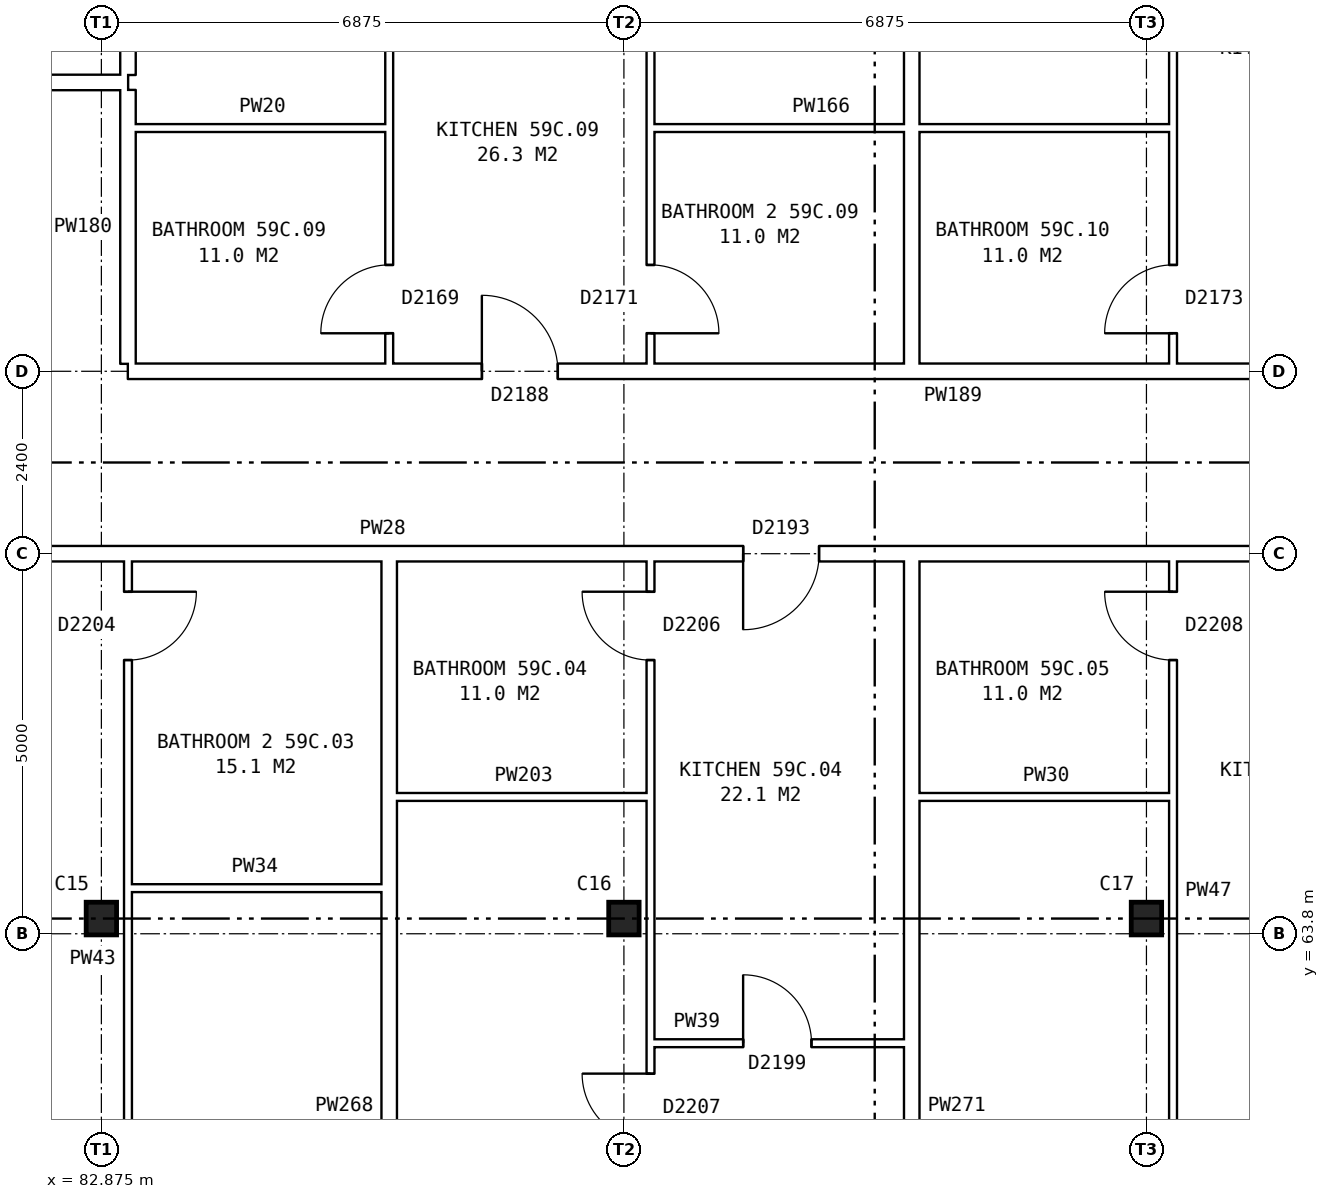
"""IFC4 building model, lengths in metres.
Left out: names, types, materials, properties, quantities, classifications, styles, units other than length and angle.
Written with IfcOpenShell. Run it as: python <this file> out.ifc"""

import sys

from ifc_helpers import new_model, si_unit, direction, frame, frame_2d, origin, origin_2d, place, context, subcontext, project, spatial, rectangle, i_section, extrude, element, fill, save


model = new_model("IFC4")
c1 = context("Model", 3, precision=1e-05, world=origin(), true_north=direction((0.0, 1.0)))
c2 = subcontext(c1, "Body", "Model", "MODEL_VIEW")
j1 = project(units=[si_unit("LENGTHUNIT", "METRE"), si_unit("PLANEANGLEUNIT", "RADIAN")], contexts=[c1])
p1 = place(None, origin())
s1 = spatial("IfcSite", under=j1, at=p1, CompositionType="ELEMENT")
p2 = place(p1, origin())
s2 = spatial("IfcBuilding", under=s1, at=p2, CompositionType="ELEMENT")
p3 = place(p2, frame((0.0, 0.0, 209.0)))
s3 = spatial("IfcBuildingStorey", under=s2, at=p3, CompositionType="ELEMENT", Elevation=209.0)
for number, where, z_axis, x_axis in (
    (1, (82.875, 64.0, 0.0), (0.0, 0.0, 1.0), (1.0, 0.0, 0.0)),
    (2, (89.75, 64.0, 0.0), (0.0, 0.0, 1.0), (1.0, 0.0, 0.0)),
    (3, (96.625, 64.0, 0.0), (0.0, 0.0, 1.0), (1.0, 0.0, 0.0)),
):
    element("IfcColumn", number, at=place(p3, frame(where, z_axis=z_axis, x_axis=x_axis)), inside=s3, PredefinedType="COLUMN", context=c2, shape_type="SweptSolid", body=[
        extrude(i_section(OverallWidth=0.4, OverallDepth=0.43, WebThickness=0.04, FlangeThickness=0.04, at=origin_2d()), origin(), (0.0, 0.0, 1.0), 2.85),
    ])
p4 = place(p3, frame((90.1, 62.36, 0.0), z_axis=(0.0, 0.0, 1.0), x_axis=(1.0, 0.0, 0.0)))
e4 = element("IfcWall", 4, at=p4, inside=s3, PredefinedType="PARTITIONING", context=c2, shape_type="SweptSolid", body=[
    extrude(rectangle(XDim=3.337, YDim=0.1, at=frame_2d((1.668, 0.0))), origin(), (0.0, 0.0, 1.0), 2.85),
])
p5 = place(p4, frame((1.219, 0.0, 0.0)))
e5 = element("IfcOpeningElement", 5, at=p5, cuts=e4, PredefinedType="OPENING", context=c2, shape_type="SweptSolid", body=[
    extrude(rectangle(XDim=0.9, YDim=2.1, at=frame_2d((0.45, 1.05))), frame((0.0, 0.06, 0.0), z_axis=(0.0, -1.0, 0.0), x_axis=(1.0, 0.0, 0.0)), (0.0, 0.0, 1.0), 0.12),
])
p6 = place(p3, frame((83.225, 64.4, 0.0), z_axis=(0.0, 0.0, 1.0), x_axis=(1.0, 0.0, 0.0)))
e6 = element("IfcWall", 6, at=p6, inside=s3, PredefinedType="PARTITIONING", context=c2, shape_type="SweptSolid", body=[
    extrude(rectangle(XDim=3.337, YDim=0.1, at=frame_2d((1.668, 0.0))), origin(), (0.0, 0.0, 1.0), 2.85),
])
for number, where, z_axis, x_axis in (
    (7, (86.762, 65.6, 0.0), (0.0, 0.0, 1.0), (1.0, 0.0, 0.0)),
    (8, (93.637, 65.6, 0.0), (0.0, 0.0, 1.0), (1.0, 0.0, 0.0)),
):
    element("IfcWall", number, at=place(p3, frame(where, z_axis=z_axis, x_axis=x_axis)), inside=s3, PredefinedType="PARTITIONING", context=c2, shape_type="SweptSolid", body=[
        extrude(rectangle(XDim=3.338, YDim=0.1, at=frame_2d((1.669, 0.0))), origin(), (0.0, 0.0, 1.0), 2.85),
    ])
p7 = place(p3, frame((75.64, 68.8, 0.0), z_axis=(0.0, 0.0, 1.0), x_axis=(1.0, 0.0, 0.0)))
e9 = element("IfcWall", 9, at=p7, inside=s3, PredefinedType="PARTITIONING", context=c2, shape_type="SweptSolid", body=[
    extrude(rectangle(XDim=55.72, YDim=0.2, at=frame_2d((27.86, 0.0))), origin(), (0.0, 0.0, 1.0), 2.85),
])
p8 = place(p7, frame((5.191, 0.0, 0.0)))
e10 = element("IfcOpeningElement", 10, at=p8, cuts=e9, PredefinedType="OPENING", context=c2, shape_type="SweptSolid", body=[
    extrude(rectangle(XDim=1.0, YDim=2.1, at=frame_2d((0.5, 1.05))), frame((0.0, 0.11, 0.0), z_axis=(0.0, -1.0, 0.0), x_axis=(1.0, 0.0, 0.0)), (0.0, 0.0, 1.0), 0.22),
])
p9 = place(p7, frame((15.678, 0.0, 0.0)))
e11 = element("IfcOpeningElement", 11, at=p9, cuts=e9, PredefinedType="OPENING", context=c2, shape_type="SweptSolid", body=[
    extrude(rectangle(XDim=1.0, YDim=2.1, at=frame_2d((0.5, 1.05))), frame((0.0, 0.11, 0.0), z_axis=(0.0, -1.0, 0.0), x_axis=(1.0, 0.0, 0.0)), (0.0, 0.0, 1.0), 0.22),
])
p10 = place(p7, frame((22.553, 0.0, 0.0)))
e12 = element("IfcOpeningElement", 12, at=p10, cuts=e9, PredefinedType="OPENING", context=c2, shape_type="SweptSolid", body=[
    extrude(rectangle(XDim=1.0, YDim=2.1, at=frame_2d((0.5, 1.05))), frame((0.0, 0.11, 0.0), z_axis=(0.0, -1.0, 0.0), x_axis=(1.0, 0.0, 0.0)), (0.0, 0.0, 1.0), 0.22),
])
p11 = place(p7, frame((32.866, 0.0, 0.0)))
e13 = element("IfcOpeningElement", 13, at=p11, cuts=e9, PredefinedType="OPENING", context=c2, shape_type="SweptSolid", body=[
    extrude(rectangle(XDim=1.0, YDim=2.1, at=frame_2d((0.5, 1.05))), frame((0.0, 0.11, 0.0), z_axis=(0.0, -1.0, 0.0), x_axis=(1.0, 0.0, 0.0)), (0.0, 0.0, 1.0), 0.22),
])
p12 = place(p7, frame((43.178, 0.0, 0.0)))
e14 = element("IfcOpeningElement", 14, at=p12, cuts=e9, PredefinedType="OPENING", context=c2, shape_type="SweptSolid", body=[
    extrude(rectangle(XDim=1.0, YDim=2.1, at=frame_2d((0.5, 1.05))), frame((0.0, 0.11, 0.0), z_axis=(0.0, -1.0, 0.0), x_axis=(1.0, 0.0, 0.0)), (0.0, 0.0, 1.0), 0.22),
])
p13 = place(p7, frame((50.053, 0.0, 0.0)))
e15 = element("IfcOpeningElement", 15, at=p13, cuts=e9, PredefinedType="OPENING", context=c2, shape_type="SweptSolid", body=[
    extrude(rectangle(XDim=1.0, YDim=2.1, at=frame_2d((0.5, 1.05))), frame((0.0, 0.11, 0.0), z_axis=(0.0, -1.0, 0.0), x_axis=(1.0, 0.0, 0.0)), (0.0, 0.0, 1.0), 0.22),
])
p14 = place(p3, frame((83.225, 71.2, 0.0), z_axis=(0.0, 0.0, 1.0), x_axis=(1.0, 0.0, 0.0)))
e16 = element("IfcWall", 16, at=p14, inside=s3, PredefinedType="PARTITIONING", context=c2, shape_type="SweptSolid", body=[
    extrude(rectangle(XDim=41.25, YDim=0.2, at=frame_2d((20.625, 0.0))), origin(), (0.0, 0.0, 1.0), 2.85),
])
p15 = place(p14, frame((4.656, 0.0, 0.0)))
e17 = element("IfcOpeningElement", 17, at=p15, cuts=e16, PredefinedType="OPENING", context=c2, shape_type="SweptSolid", body=[
    extrude(rectangle(XDim=1.0, YDim=2.1, at=frame_2d((0.5, 1.05))), frame((0.0, 0.11, 0.0), z_axis=(0.0, -1.0, 0.0), x_axis=(1.0, 0.0, 0.0)), (0.0, 0.0, 1.0), 0.22),
])
p16 = place(p14, frame((14.969, 0.0, 0.0)))
e18 = element("IfcOpeningElement", 18, at=p16, cuts=e16, PredefinedType="OPENING", context=c2, shape_type="SweptSolid", body=[
    extrude(rectangle(XDim=1.0, YDim=2.1, at=frame_2d((0.5, 1.05))), frame((0.0, 0.11, 0.0), z_axis=(0.0, -1.0, 0.0), x_axis=(1.0, 0.0, 0.0)), (0.0, 0.0, 1.0), 0.22),
])
p17 = place(p14, frame((25.281, 0.0, 0.0)))
e19 = element("IfcOpeningElement", 19, at=p17, cuts=e16, PredefinedType="OPENING", context=c2, shape_type="SweptSolid", body=[
    extrude(rectangle(XDim=1.0, YDim=2.1, at=frame_2d((0.5, 1.05))), frame((0.0, 0.11, 0.0), z_axis=(0.0, -1.0, 0.0), x_axis=(1.0, 0.0, 0.0)), (0.0, 0.0, 1.0), 0.22),
])
p18 = place(p14, frame((35.594, 0.0, 0.0)))
e20 = element("IfcOpeningElement", 20, at=p18, cuts=e16, PredefinedType="OPENING", context=c2, shape_type="SweptSolid", body=[
    extrude(rectangle(XDim=1.0, YDim=2.1, at=frame_2d((0.5, 1.05))), frame((0.0, 0.11, 0.0), z_axis=(0.0, -1.0, 0.0), x_axis=(1.0, 0.0, 0.0)), (0.0, 0.0, 1.0), 0.22),
])
p19 = place(p3, frame((83.325, 74.4, 0.0), z_axis=(0.0, 0.0, 1.0), x_axis=(1.0, 0.0, 0.0)))
e21 = element("IfcWall", 21, at=p19, inside=s3, PredefinedType="PARTITIONING", context=c2, shape_type="SweptSolid", body=[
    extrude(rectangle(XDim=3.337, YDim=0.1, at=frame_2d((1.668, 0.0))), origin(), (0.0, 0.0, 1.0), 2.85),
])
p20 = place(p3, frame((90.1, 74.4, 0.0), z_axis=(0.0, 0.0, 1.0), x_axis=(1.0, 0.0, 0.0)))
e22 = element("IfcWall", 22, at=p20, inside=s3, PredefinedType="PARTITIONING", context=c2, shape_type="SweptSolid", body=[
    extrude(rectangle(XDim=6.875, YDim=0.1, at=frame_2d((3.438, 0.0))), origin(), (0.0, 0.0, 1.0), 2.85),
])
p21 = place(p3, frame((75.64, 75.0, 0.0), z_axis=(0.0, 0.0, 1.0), x_axis=(1.0, 0.0, 0.0)))
e23 = element("IfcWall", 23, at=p21, inside=s3, PredefinedType="PARTITIONING", context=c2, shape_type="SweptSolid", body=[
    extrude(rectangle(XDim=7.585, YDim=0.2, at=frame_2d((3.792, 0.0))), origin(), (0.0, 0.0, 1.0), 2.85),
])
p22 = place(p21, frame((3.343, 0.0, 0.0)))
e24 = element("IfcOpeningElement", 24, at=p22, cuts=e23, PredefinedType="OPENING", context=c2, shape_type="SweptSolid", body=[
    extrude(rectangle(XDim=0.9, YDim=2.1, at=frame_2d((0.45, 1.05))), frame((0.0, 0.11, 0.0), z_axis=(0.0, -1.0, 0.0), x_axis=(1.0, 0.0, 0.0)), (0.0, 0.0, 1.0), 0.22),
])
p23 = place(p3, frame((83.225, 54.36, 0.0), z_axis=(0.0, 0.0, 1.0), x_axis=(0.0, 1.0, 0.0)))
e25 = element("IfcWall", 25, at=p23, inside=s3, PredefinedType="PARTITIONING", context=c2, shape_type="SweptSolid", body=[
    extrude(rectangle(XDim=14.34, YDim=0.1, at=frame_2d((7.17, 0.0))), origin(), (0.0, 0.0, 1.0), 2.85),
])
p24 = place(p23, frame((5.5, 0.0, 0.0)))
e26 = element("IfcOpeningElement", 26, at=p24, cuts=e25, PredefinedType="OPENING", context=c2, shape_type="SweptSolid", body=[
    extrude(rectangle(XDim=0.9, YDim=2.1, at=frame_2d((0.45, 1.05))), frame((0.0, 0.06, 0.0), z_axis=(0.0, -1.0, 0.0), x_axis=(1.0, 0.0, 0.0)), (0.0, 0.0, 1.0), 0.12),
])
p25 = place(p23, frame((13.04, 0.0, 0.0)))
e27 = element("IfcOpeningElement", 27, at=p25, cuts=e25, PredefinedType="OPENING", context=c2, shape_type="SweptSolid", body=[
    extrude(rectangle(XDim=0.9, YDim=2.1, at=frame_2d((0.45, 1.05))), frame((0.0, 0.06, 0.0), z_axis=(0.0, -1.0, 0.0), x_axis=(1.0, 0.0, 0.0)), (0.0, 0.0, 1.0), 0.12),
])
p26 = place(p3, frame((83.225, 71.3, 0.0), z_axis=(0.0, 0.0, 1.0), x_axis=(0.0, 1.0, 0.0)))
e28 = element("IfcWall", 28, at=p26, inside=s3, PredefinedType="PARTITIONING", context=c2, shape_type="SweptSolid", body=[
    extrude(rectangle(XDim=3.6, YDim=0.2, at=frame_2d((1.8, 0.0))), origin(), (0.0, 0.0, 1.0), 2.85),
])
p27 = place(p3, frame((83.225, 75.1, 0.0), z_axis=(0.0, 0.0, 1.0), x_axis=(0.0, 1.0, 0.0)))
e29 = element("IfcWall", 29, at=p27, inside=s3, PredefinedType="PARTITIONING", context=c2, shape_type="SweptSolid", body=[
    extrude(rectangle(XDim=10.54, YDim=0.2, at=frame_2d((5.27, 0.0))), origin(), (0.0, 0.0, 1.0), 2.85),
])
p28 = place(p3, frame((86.662, 54.36, 0.0), z_axis=(0.0, 0.0, 1.0), x_axis=(0.0, 1.0, 0.0)))
e30 = element("IfcWall", 30, at=p28, inside=s3, PredefinedType="PARTITIONING", context=c2, shape_type="SweptSolid", body=[
    extrude(rectangle(XDim=14.34, YDim=0.2, at=frame_2d((7.17, 0.0))), origin(), (0.0, 0.0, 1.0), 2.85),
])
p29 = place(p3, frame((86.662, 71.3, 0.0), z_axis=(0.0, 0.0, 1.0), x_axis=(0.0, 1.0, 0.0)))
e31 = element("IfcWall", 31, at=p29, inside=s3, PredefinedType="PARTITIONING", context=c2, shape_type="SweptSolid", body=[
    extrude(rectangle(XDim=14.34, YDim=0.1, at=frame_2d((7.17, 0.0))), origin(), (0.0, 0.0, 1.0), 2.85),
])
p30 = place(p29, frame((7.94, 0.0, 0.0)))
e32 = element("IfcOpeningElement", 32, at=p30, cuts=e31, PredefinedType="OPENING", context=c2, shape_type="SweptSolid", body=[
    extrude(rectangle(XDim=0.9, YDim=2.1, at=frame_2d((0.45, 1.05))), frame((0.0, 0.06, 0.0), z_axis=(0.0, -1.0, 0.0), x_axis=(1.0, 0.0, 0.0)), (0.0, 0.0, 1.0), 0.12),
])
p31 = place(p29, frame((0.4, 0.0, 0.0)))
e33 = element("IfcOpeningElement", 33, at=p31, cuts=e31, PredefinedType="OPENING", context=c2, shape_type="SweptSolid", body=[
    extrude(rectangle(XDim=0.9, YDim=2.1, at=frame_2d((0.45, 1.05))), frame((0.0, 0.06, 0.0), z_axis=(0.0, -1.0, 0.0), x_axis=(1.0, 0.0, 0.0)), (0.0, 0.0, 1.0), 0.12),
])
p32 = place(p3, frame((90.1, 54.36, 0.0), z_axis=(0.0, 0.0, 1.0), x_axis=(0.0, 1.0, 0.0)))
e34 = element("IfcWall", 34, at=p32, inside=s3, PredefinedType="PARTITIONING", context=c2, shape_type="SweptSolid", body=[
    extrude(rectangle(XDim=14.34, YDim=0.1, at=frame_2d((7.17, 0.0))), origin(), (0.0, 0.0, 1.0), 2.85),
])
p33 = place(p32, frame((6.7, 0.0, 0.0)))
e35 = element("IfcOpeningElement", 35, at=p33, cuts=e34, PredefinedType="OPENING", context=c2, shape_type="SweptSolid", body=[
    extrude(rectangle(XDim=0.9, YDim=2.1, at=frame_2d((0.45, 1.05))), frame((0.0, 0.06, 0.0), z_axis=(0.0, -1.0, 0.0), x_axis=(1.0, 0.0, 0.0)), (0.0, 0.0, 1.0), 0.12),
])
p34 = place(p32, frame((13.04, 0.0, 0.0)))
e36 = element("IfcOpeningElement", 36, at=p34, cuts=e34, PredefinedType="OPENING", context=c2, shape_type="SweptSolid", body=[
    extrude(rectangle(XDim=0.9, YDim=2.1, at=frame_2d((0.45, 1.05))), frame((0.0, 0.06, 0.0), z_axis=(0.0, -1.0, 0.0), x_axis=(1.0, 0.0, 0.0)), (0.0, 0.0, 1.0), 0.12),
])
p35 = place(p3, frame((90.1, 71.3, 0.0), z_axis=(0.0, 0.0, 1.0), x_axis=(0.0, 1.0, 0.0)))
e37 = element("IfcWall", 37, at=p35, inside=s3, PredefinedType="PARTITIONING", context=c2, shape_type="SweptSolid", body=[
    extrude(rectangle(XDim=14.34, YDim=0.1, at=frame_2d((7.17, 0.0))), origin(), (0.0, 0.0, 1.0), 2.85),
])
p36 = place(p35, frame((7.94, 0.0, 0.0)))
e38 = element("IfcOpeningElement", 38, at=p36, cuts=e37, PredefinedType="OPENING", context=c2, shape_type="SweptSolid", body=[
    extrude(rectangle(XDim=0.9, YDim=2.1, at=frame_2d((0.45, 1.05))), frame((0.0, 0.06, 0.0), z_axis=(0.0, -1.0, 0.0), x_axis=(1.0, 0.0, 0.0)), (0.0, 0.0, 1.0), 0.12),
])
p37 = place(p35, frame((0.4, 0.0, 0.0)))
e39 = element("IfcOpeningElement", 39, at=p37, cuts=e37, PredefinedType="OPENING", context=c2, shape_type="SweptSolid", body=[
    extrude(rectangle(XDim=0.9, YDim=2.1, at=frame_2d((0.45, 1.05))), frame((0.0, 0.06, 0.0), z_axis=(0.0, -1.0, 0.0), x_axis=(1.0, 0.0, 0.0)), (0.0, 0.0, 1.0), 0.12),
])
for number, where, z_axis, x_axis in (
    (40, (93.537, 54.36, 0.0), (0.0, 0.0, 1.0), (0.0, 1.0, 0.0)),
    (41, (93.537, 71.3, 0.0), (0.0, 0.0, 1.0), (0.0, 1.0, 0.0)),
):
    element("IfcWall", number, at=place(p3, frame(where, z_axis=z_axis, x_axis=x_axis)), inside=s3, PredefinedType="PARTITIONING", context=c2, shape_type="SweptSolid", body=[
        extrude(rectangle(XDim=14.34, YDim=0.2, at=frame_2d((7.17, 0.0))), origin(), (0.0, 0.0, 1.0), 2.85),
    ])
p38 = place(p3, frame((96.975, 54.36, 0.0), z_axis=(0.0, 0.0, 1.0), x_axis=(0.0, 1.0, 0.0)))
e42 = element("IfcWall", 42, at=p38, inside=s3, PredefinedType="PARTITIONING", context=c2, shape_type="SweptSolid", body=[
    extrude(rectangle(XDim=14.34, YDim=0.1, at=frame_2d((7.17, 0.0))), origin(), (0.0, 0.0, 1.0), 2.85),
])
p39 = place(p38, frame((5.5, 0.0, 0.0)))
e43 = element("IfcOpeningElement", 43, at=p39, cuts=e42, PredefinedType="OPENING", context=c2, shape_type="SweptSolid", body=[
    extrude(rectangle(XDim=0.9, YDim=2.1, at=frame_2d((0.45, 1.05))), frame((0.0, 0.06, 0.0), z_axis=(0.0, -1.0, 0.0), x_axis=(1.0, 0.0, 0.0)), (0.0, 0.0, 1.0), 0.12),
])
p40 = place(p38, frame((13.04, 0.0, 0.0)))
e44 = element("IfcOpeningElement", 44, at=p40, cuts=e42, PredefinedType="OPENING", context=c2, shape_type="SweptSolid", body=[
    extrude(rectangle(XDim=0.9, YDim=2.1, at=frame_2d((0.45, 1.05))), frame((0.0, 0.06, 0.0), z_axis=(0.0, -1.0, 0.0), x_axis=(1.0, 0.0, 0.0)), (0.0, 0.0, 1.0), 0.12),
])
p41 = place(p3, frame((96.975, 71.3, 0.0), z_axis=(0.0, 0.0, 1.0), x_axis=(0.0, 1.0, 0.0)))
e45 = element("IfcWall", 45, at=p41, inside=s3, PredefinedType="PARTITIONING", context=c2, shape_type="SweptSolid", body=[
    extrude(rectangle(XDim=14.34, YDim=0.1, at=frame_2d((7.17, 0.0))), origin(), (0.0, 0.0, 1.0), 2.85),
])
p42 = place(p41, frame((7.94, 0.0, 0.0)))
e46 = element("IfcOpeningElement", 46, at=p42, cuts=e45, PredefinedType="OPENING", context=c2, shape_type="SweptSolid", body=[
    extrude(rectangle(XDim=0.9, YDim=2.1, at=frame_2d((0.45, 1.05))), frame((0.0, 0.06, 0.0), z_axis=(0.0, -1.0, 0.0), x_axis=(1.0, 0.0, 0.0)), (0.0, 0.0, 1.0), 0.12),
])
p43 = place(p41, frame((0.4, 0.0, 0.0)))
e47 = element("IfcOpeningElement", 47, at=p43, cuts=e45, PredefinedType="OPENING", context=c2, shape_type="SweptSolid", body=[
    extrude(rectangle(XDim=0.9, YDim=2.1, at=frame_2d((0.45, 1.05))), frame((0.0, 0.06, 0.0), z_axis=(0.0, -1.0, 0.0), x_axis=(1.0, 0.0, 0.0)), (0.0, 0.0, 1.0), 0.12),
])
p44 = place(p25, frame((0.9, 0.0, 0.0), z_axis=(0.0, 0.0, 1.0), x_axis=(-1.0, 0.0, 0.0)))
e48 = element("IfcDoor", 48, at=p44, inside=s3, OperationType="SINGLE_SWING_LEFT", PredefinedType="DOOR", context=c2, shape_type="SweptSolid", body=[
    extrude(rectangle(XDim=0.9, YDim=2.1, at=frame_2d((0.45, 1.05))), frame((0.0, 0.025, 0.0), z_axis=(0.0, -1.0, 0.0), x_axis=(1.0, 0.0, 0.0)), (0.0, 0.0, 1.0), 0.05),
])
fill(e27, e48)
p45 = place(p33, origin())
e49 = element("IfcDoor", 49, at=p45, inside=s3, OperationType="SINGLE_SWING_RIGHT", PredefinedType="DOOR", context=c2, shape_type="SweptSolid", body=[
    extrude(rectangle(XDim=0.9, YDim=2.1, at=frame_2d((0.45, 1.05))), frame((0.0, 0.025, 0.0), z_axis=(0.0, -1.0, 0.0), x_axis=(1.0, 0.0, 0.0)), (0.0, 0.0, 1.0), 0.05),
])
fill(e35, e49)
p46 = place(p9, frame((1.0, 0.0, 0.0), z_axis=(0.0, 0.0, 1.0), x_axis=(-1.0, 0.0, 0.0)))
e50 = element("IfcDoor", 50, at=p46, inside=s3, OperationType="SINGLE_SWING_RIGHT", PredefinedType="DOOR", context=c2, shape_type="SweptSolid", body=[
    extrude(rectangle(XDim=1.0, YDim=2.1, at=frame_2d((0.5, 1.05))), frame((0.0, 0.025, 0.0), z_axis=(0.0, -1.0, 0.0), x_axis=(1.0, 0.0, 0.0)), (0.0, 0.0, 1.0), 0.05),
])
fill(e11, e50)
p47 = place(p5, origin())
e51 = element("IfcDoor", 51, at=p47, inside=s3, OperationType="SINGLE_SWING_LEFT", PredefinedType="DOOR", context=c2, shape_type="SweptSolid", body=[
    extrude(rectangle(XDim=0.9, YDim=2.1, at=frame_2d((0.45, 1.05))), frame((0.0, 0.025, 0.0), z_axis=(0.0, -1.0, 0.0), x_axis=(1.0, 0.0, 0.0)), (0.0, 0.0, 1.0), 0.05),
])
fill(e5, e51)
p48 = place(p34, origin())
e52 = element("IfcDoor", 52, at=p48, inside=s3, OperationType="SINGLE_SWING_RIGHT", PredefinedType="DOOR", context=c2, shape_type="SweptSolid", body=[
    extrude(rectangle(XDim=0.9, YDim=2.1, at=frame_2d((0.45, 1.05))), frame((0.0, 0.025, 0.0), z_axis=(0.0, -1.0, 0.0), x_axis=(1.0, 0.0, 0.0)), (0.0, 0.0, 1.0), 0.05),
])
fill(e36, e52)
p49 = place(p40, origin())
e53 = element("IfcDoor", 53, at=p49, inside=s3, OperationType="SINGLE_SWING_RIGHT", PredefinedType="DOOR", context=c2, shape_type="SweptSolid", body=[
    extrude(rectangle(XDim=0.9, YDim=2.1, at=frame_2d((0.45, 1.05))), frame((0.0, 0.025, 0.0), z_axis=(0.0, -1.0, 0.0), x_axis=(1.0, 0.0, 0.0)), (0.0, 0.0, 1.0), 0.05),
])
fill(e44, e53)
p50 = place(p15, origin())
e54 = element("IfcDoor", 54, at=p50, inside=s3, OperationType="SINGLE_SWING_LEFT", PredefinedType="DOOR", context=c2, shape_type="SweptSolid", body=[
    extrude(rectangle(XDim=1.0, YDim=2.1, at=frame_2d((0.5, 1.05))), frame((0.0, 0.025, 0.0), z_axis=(0.0, -1.0, 0.0), x_axis=(1.0, 0.0, 0.0)), (0.0, 0.0, 1.0), 0.05),
])
fill(e17, e54)
p51 = place(p31, origin())
e55 = element("IfcDoor", 55, at=p51, inside=s3, OperationType="SINGLE_SWING_LEFT", PredefinedType="DOOR", context=c2, shape_type="SweptSolid", body=[
    extrude(rectangle(XDim=0.9, YDim=2.1, at=frame_2d((0.45, 1.05))), frame((0.0, 0.025, 0.0), z_axis=(0.0, -1.0, 0.0), x_axis=(1.0, 0.0, 0.0)), (0.0, 0.0, 1.0), 0.05),
])
fill(e33, e55)
p52 = place(p37, frame((0.9, 0.0, 0.0), z_axis=(0.0, 0.0, 1.0), x_axis=(-1.0, 0.0, 0.0)))
e56 = element("IfcDoor", 56, at=p52, inside=s3, OperationType="SINGLE_SWING_RIGHT", PredefinedType="DOOR", context=c2, shape_type="SweptSolid", body=[
    extrude(rectangle(XDim=0.9, YDim=2.1, at=frame_2d((0.45, 1.05))), frame((0.0, 0.025, 0.0), z_axis=(0.0, -1.0, 0.0), x_axis=(1.0, 0.0, 0.0)), (0.0, 0.0, 1.0), 0.05),
])
fill(e39, e56)
p53 = place(p43, origin())
e57 = element("IfcDoor", 57, at=p53, inside=s3, OperationType="SINGLE_SWING_LEFT", PredefinedType="DOOR", context=c2, shape_type="SweptSolid", body=[
    extrude(rectangle(XDim=0.9, YDim=2.1, at=frame_2d((0.45, 1.05))), frame((0.0, 0.025, 0.0), z_axis=(0.0, -1.0, 0.0), x_axis=(1.0, 0.0, 0.0)), (0.0, 0.0, 1.0), 0.05),
])
fill(e47, e57)
save(model, sys.argv[1])
